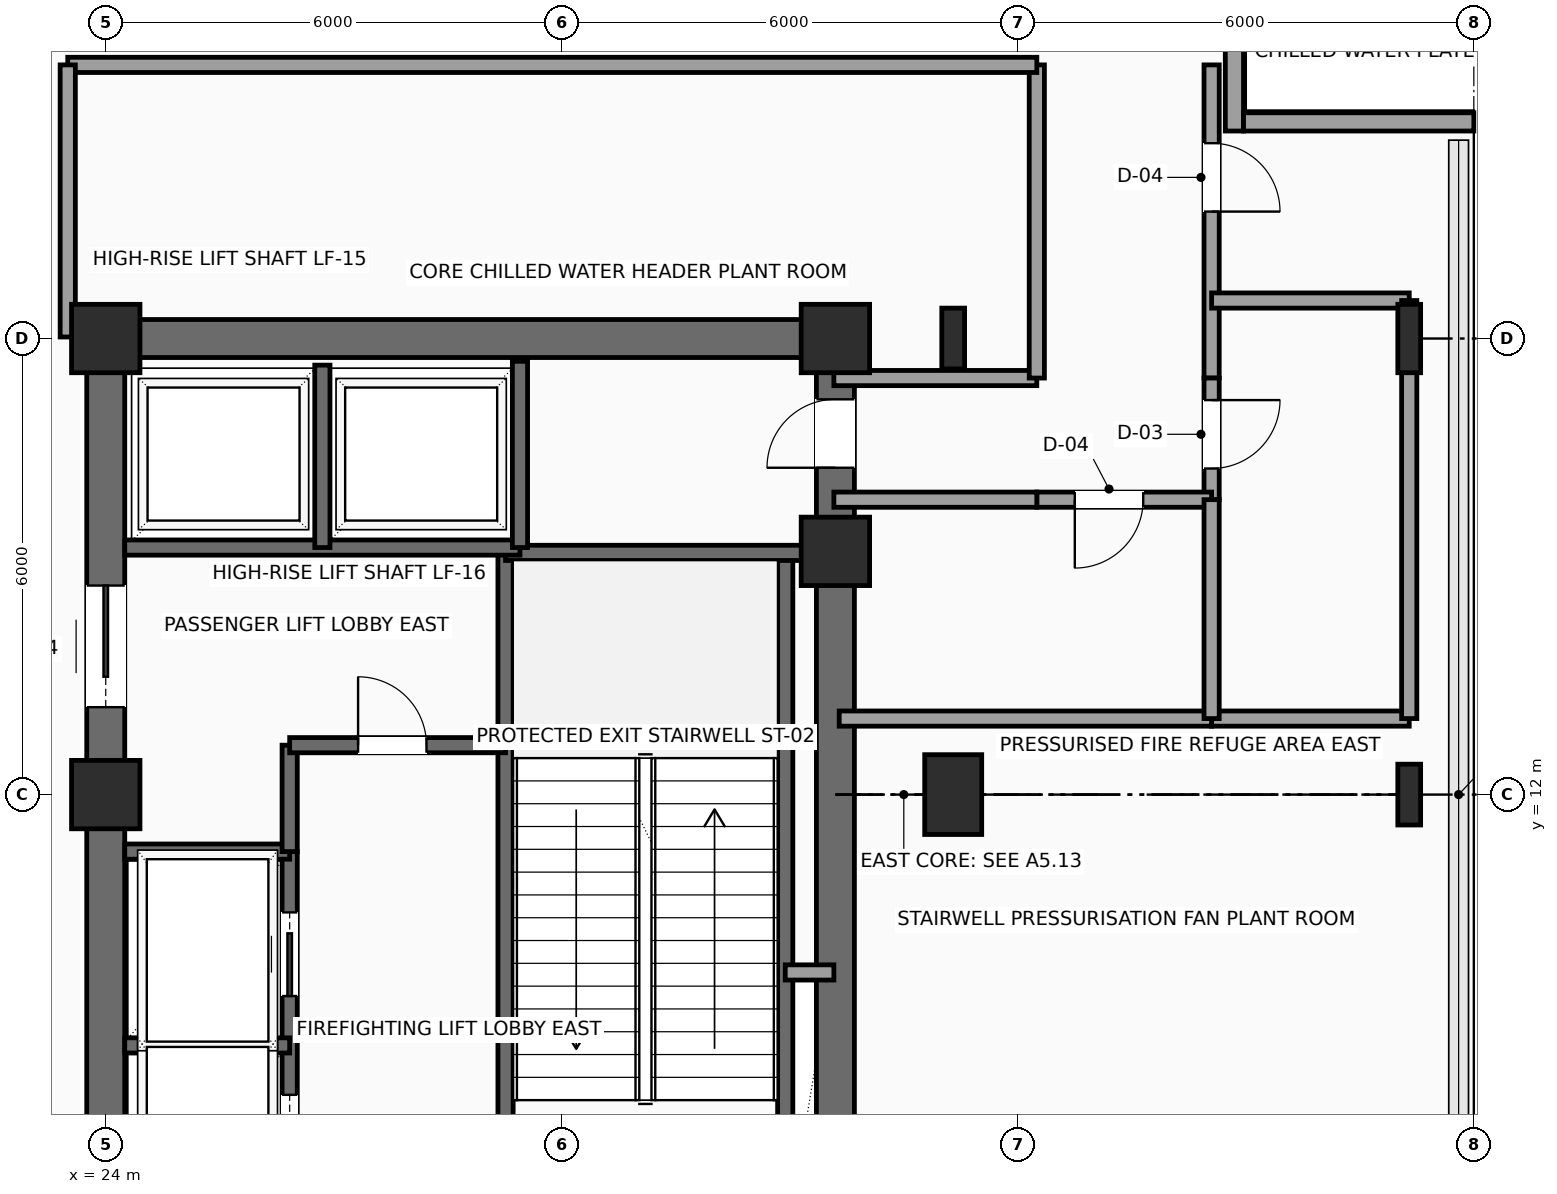
"""IFC4 building model, lengths in metres.
Left out: names, types, materials, properties, quantities, classifications, styles, units other than length and angle.
Written with IfcOpenShell. Run it as: python <this file> out.ifc"""

import sys

from ifc_helpers import new_model, si_unit, direction, frame, frame_2d, origin, origin_2d, place, context, subcontext, project, spatial, rectangle, i_section, extrude, element, fill, save


model = new_model("IFC4")
c1 = context("Model", 3, precision=1e-05, world=origin(), true_north=direction((0.0, 1.0)))
c2 = subcontext(c1, "Body", "Model", "MODEL_VIEW")
j1 = project(units=[si_unit("LENGTHUNIT", "METRE"), si_unit("PLANEANGLEUNIT", "RADIAN")], contexts=[c1])
p1 = place(None, origin())
s1 = spatial("IfcSite", under=j1, at=p1, CompositionType="ELEMENT")
p2 = place(p1, origin())
s2 = spatial("IfcBuilding", under=s1, at=p2, CompositionType="ELEMENT")
p3 = place(p2, frame((0.0, 0.0, 234.9)))
s3 = spatial("IfcBuildingStorey", under=s2, at=p3, CompositionType="ELEMENT", Elevation=234.9)
for number, where, z_axis, x_axis in (
    (1, (24.0, 12.0, 0.0), (0.0, 0.0, 1.0), (1.0, 0.0, 0.0)),
    (2, (24.0, 18.0, 0.0), (0.0, 0.0, 1.0), (1.0, 0.0, 0.0)),
    (3, (33.6, 15.2, 0.0), (0.0, 0.0, 1.0), (1.0, 0.0, 0.0)),
    (4, (33.6, 18.0, 0.0), (0.0, 0.0, 1.0), (1.0, 0.0, 0.0)),
):
    element("IfcColumn", number, at=place(p3, frame(where, z_axis=z_axis, x_axis=x_axis)), inside=s3, PredefinedType="COLUMN", context=c2, shape_type="SweptSolid", body=[
        extrude(rectangle(XDim=0.9, YDim=0.9, at=origin_2d()), origin(), (0.0, 0.0, 1.0), 4.8),
    ])
p4 = place(p3, frame((35.15, 12.0, 0.0), z_axis=(0.0, 0.0, 1.0), x_axis=(1.0, 0.0, 0.0)))
e5 = element("IfcColumn", 5, at=p4, inside=s3, PredefinedType="COLUMN", context=c2, shape_type="SweptSolid", body=[
    extrude(rectangle(XDim=0.75, YDim=1.05, at=origin_2d()), origin(), (0.0, 0.0, 1.0), 4.8),
])
p5 = place(p3, frame((35.15, 18.0, 0.0), z_axis=(0.0, 0.0, 1.0), x_axis=(1.0, 0.0, 0.0)))
e6 = element("IfcColumn", 6, at=p5, inside=s3, PredefinedType="COLUMN", context=c2, shape_type="SweptSolid", body=[
    extrude(i_section(OverallWidth=0.3, OverallDepth=0.8, WebThickness=0.018, FlangeThickness=0.033, FilletRadius=0.03, at=origin_2d()), origin(), (0.0, 0.0, 1.0), 4.8),
])
p6 = place(p3, frame((41.15, 12.0, 0.0), z_axis=(0.0, 0.0, 1.0), x_axis=(1.0, 0.0, 0.0)))
e7 = element("IfcColumn", 7, at=p6, inside=s3, PredefinedType="COLUMN", context=c2, shape_type="SweptSolid", body=[
    extrude(i_section(OverallWidth=0.3, OverallDepth=0.8, WebThickness=0.018, FlangeThickness=0.033, FilletRadius=0.03, at=origin_2d()), origin(), (0.0, 0.0, 1.0), 4.56),
])
p7 = place(p3, frame((41.15, 18.0, 0.0), z_axis=(0.0, 0.0, 1.0), x_axis=(1.0, 0.0, 0.0)))
e8 = element("IfcColumn", 8, at=p7, inside=s3, PredefinedType="COLUMN", context=c2, shape_type="SweptSolid", body=[
    extrude(i_section(OverallWidth=0.3, OverallDepth=0.9, WebThickness=0.019, FlangeThickness=0.035, FilletRadius=0.03, at=origin_2d()), origin(), (0.0, 0.0, 1.0), 4.56),
])
p8 = place(p3, frame((38.85, 23.725, 0.0), z_axis=(0.0, 0.0, 1.0), x_axis=(0.0, -1.0, 0.0)))
e9 = element("IfcWall", 9, at=p8, inside=s3, PredefinedType="SOLIDWALL", context=c2, shape_type="SweptSolid", body=[
    extrude(rectangle(XDim=2.995, YDim=0.24, at=frame_2d((1.498, 0.0))), origin(), (0.0, 0.0, 1.0), 4.6),
])
p9 = place(p3, frame((38.97, 20.85, 0.0), z_axis=(0.0, 0.0, 1.0), x_axis=(1.0, 0.0, 0.0)))
e10 = element("IfcWall", 10, at=p9, inside=s3, PredefinedType="SOLIDWALL", context=c2, shape_type="SweptSolid", body=[
    extrude(rectangle(XDim=3.03, YDim=0.24, at=frame_2d((1.515, 0.0))), origin(), (0.0, 0.0, 1.0), 4.6),
])
p10 = place(p3, frame((24.0, 18.0, 0.0), z_axis=(0.0, 0.0, 1.0), x_axis=(1.0, 0.0, 0.0)))
e11 = element("IfcWall", 11, at=p10, inside=s3, PredefinedType="SHEAR", context=c2, shape_type="SweptSolid", body=[
    extrude(rectangle(XDim=9.6, YDim=0.5, at=frame_2d((4.8, 0.0))), origin(), (0.0, 0.0, 1.0), 4.6),
])
p11 = place(p3, frame((24.0, 6.0, 0.0), z_axis=(0.0, 0.0, 1.0), x_axis=(0.0, 1.0, 0.0)))
e12 = element("IfcWall", 12, at=p11, inside=s3, PredefinedType="SHEAR", context=c2, shape_type="SweptSolid", body=[
    extrude(rectangle(XDim=12.0, YDim=0.5, at=frame_2d((6.0, 0.0))), origin(), (0.0, 0.0, 1.0), 4.6),
])
p12 = place(p11, frame((7.15, 0.0, 0.0)))
e13 = element("IfcOpeningElement", 13, at=p12, cuts=e12, PredefinedType="OPENING", context=c2, shape_type="SweptSolid", body=[
    extrude(rectangle(XDim=1.6, YDim=2.3, at=frame_2d((0.8, 1.15))), frame((0.0, 0.26, 0.0), z_axis=(0.0, -1.0, 0.0), x_axis=(1.0, 0.0, 0.0)), (0.0, 0.0, 1.0), 0.52),
])
p13 = place(p3, frame((33.6, 6.0, 0.0), z_axis=(0.0, 0.0, 1.0), x_axis=(0.0, 1.0, 0.0)))
e14 = element("IfcWall", 14, at=p13, inside=s3, PredefinedType="SHEAR", context=c2, shape_type="SweptSolid", body=[
    extrude(rectangle(XDim=12.0, YDim=0.5, at=frame_2d((6.0, 0.0))), origin(), (0.0, 0.0, 1.0), 4.6),
])
p14 = place(p13, frame((10.3, 0.0, 0.0)))
e15 = element("IfcOpeningElement", 15, at=p14, cuts=e14, PredefinedType="OPENING", context=c2, shape_type="SweptSolid", body=[
    extrude(rectangle(XDim=0.9, YDim=2.15, at=frame_2d((0.45, 1.075))), frame((0.0, 0.26, 0.0), z_axis=(0.0, -1.0, 0.0), x_axis=(1.0, 0.0, 0.0)), (0.0, 0.0, 1.0), 0.52),
])
p15 = place(p3, frame((29.26, 6.3, 0.0), z_axis=(0.0, 0.0, 1.0), x_axis=(0.0, 1.0, 0.0)))
e16 = element("IfcWall", 16, at=p15, inside=s3, PredefinedType="SHEAR", context=c2, shape_type="SweptSolid", body=[
    extrude(rectangle(XDim=8.88, YDim=0.2, at=frame_2d((4.44, 0.0))), origin(), (0.0, 0.0, 1.0), 4.6),
])
p16 = place(p15, frame((0.35, 0.0, 0.0)))
e17 = element("IfcOpeningElement", 17, at=p16, cuts=e16, PredefinedType="OPENING", context=c2, shape_type="SweptSolid", body=[
    extrude(rectangle(XDim=1.1, YDim=2.2, at=frame_2d((0.55, 1.1))), frame((0.0, 0.11, 0.0), z_axis=(0.0, -1.0, 0.0), x_axis=(1.0, 0.0, 0.0)), (0.0, 0.0, 1.0), 0.22),
])
p17 = place(p3, frame((32.94, 6.3, 0.0), z_axis=(0.0, 0.0, 1.0), x_axis=(0.0, 1.0, 0.0)))
e18 = element("IfcWall", 18, at=p17, inside=s3, PredefinedType="SHEAR", context=c2, shape_type="SweptSolid", body=[
    extrude(rectangle(XDim=8.88, YDim=0.2, at=frame_2d((4.44, 0.0))), origin(), (0.0, 0.0, 1.0), 4.6),
])
p18 = place(p3, frame((29.26, 15.18, 0.0), z_axis=(0.0, 0.0, 1.0), x_axis=(1.0, 0.0, 0.0)))
e19 = element("IfcWall", 19, at=p18, inside=s3, PredefinedType="SHEAR", context=c2, shape_type="SweptSolid", body=[
    extrude(rectangle(XDim=4.04, YDim=0.2, at=frame_2d((2.02, 0.0))), origin(), (0.0, 0.0, 1.0), 4.6),
])
p19 = place(p3, frame((26.42, 6.3, 0.0), z_axis=(0.0, 0.0, 1.0), x_axis=(0.0, 1.0, 0.0)))
e20 = element("IfcWall", 20, at=p19, inside=s3, PredefinedType="SHEAR", context=c2, shape_type="SweptSolid", body=[
    extrude(rectangle(XDim=4.95, YDim=0.2, at=frame_2d((2.475, 0.0))), origin(), (0.0, 0.0, 1.0), 4.6),
])
p20 = place(p19, frame((0.65, 0.0, 0.0)))
e21 = element("IfcOpeningElement", 21, at=p20, cuts=e20, PredefinedType="OPENING", context=c2, shape_type="SweptSolid", body=[
    extrude(rectangle(XDim=1.1, YDim=2.2, at=frame_2d((0.55, 1.1))), frame((0.0, 0.11, 0.0), z_axis=(0.0, -1.0, 0.0), x_axis=(1.0, 0.0, 0.0)), (0.0, 0.0, 1.0), 0.22),
])
p21 = place(p19, frame((3.05, 0.0, 0.0)))
e22 = element("IfcOpeningElement", 22, at=p21, cuts=e20, PredefinedType="OPENING", context=c2, shape_type="SweptSolid", body=[
    extrude(rectangle(XDim=1.1, YDim=2.2, at=frame_2d((0.55, 1.1))), frame((0.0, 0.11, 0.0), z_axis=(0.0, -1.0, 0.0), x_axis=(1.0, 0.0, 0.0)), (0.0, 0.0, 1.0), 0.22),
])
for number, where, z_axis, x_axis in (
    (23, (24.25, 8.7, 0.0), (0.0, 0.0, 1.0), (1.0, 0.0, 0.0)),
    (24, (24.25, 11.25, 0.0), (0.0, 0.0, 1.0), (1.0, 0.0, 0.0)),
):
    element("IfcWall", number, at=place(p3, frame(where, z_axis=z_axis, x_axis=x_axis)), inside=s3, PredefinedType="SHEAR", context=c2, shape_type="SweptSolid", body=[
        extrude(rectangle(XDim=2.17, YDim=0.2, at=frame_2d((1.085, 0.0))), origin(), (0.0, 0.0, 1.0), 4.6),
    ])
p22 = place(p3, frame((26.42, 11.25, 0.0), z_axis=(0.0, 0.0, 1.0), x_axis=(0.0, 1.0, 0.0)))
e25 = element("IfcWall", 25, at=p22, inside=s3, PredefinedType="SHEAR", context=c2, shape_type="SweptSolid", body=[
    extrude(rectangle(XDim=1.4, YDim=0.2, at=frame_2d((0.7, 0.0))), origin(), (0.0, 0.0, 1.0), 4.6),
])
p23 = place(p3, frame((26.42, 12.65, 0.0), z_axis=(0.0, 0.0, 1.0), x_axis=(1.0, 0.0, 0.0)))
e26 = element("IfcWall", 26, at=p23, inside=s3, PredefinedType="SHEAR", context=c2, shape_type="SweptSolid", body=[
    extrude(rectangle(XDim=2.84, YDim=0.2, at=frame_2d((1.42, 0.0))), origin(), (0.0, 0.0, 1.0), 4.6),
])
p24 = place(p23, frame((0.9, 0.0, 0.0)))
e27 = element("IfcOpeningElement", 27, at=p24, cuts=e26, PredefinedType="OPENING", context=c2, shape_type="SweptSolid", body=[
    extrude(rectangle(XDim=0.9, YDim=2.15, at=frame_2d((0.45, 1.075))), frame((0.0, 0.11, 0.0), z_axis=(0.0, -1.0, 0.0), x_axis=(1.0, 0.0, 0.0)), (0.0, 0.0, 1.0), 0.22),
])
p25 = place(p3, frame((32.94, 9.66, 0.0), z_axis=(0.0, 0.0, 1.0), x_axis=(1.0, 0.0, 0.0)))
e28 = element("IfcWall", 28, at=p25, inside=s3, PredefinedType="SOLIDWALL", context=c2, shape_type="SweptSolid", body=[
    extrude(rectangle(XDim=0.64, YDim=0.2, at=frame_2d((0.32, 0.0))), origin(), (0.0, 0.0, 1.0), 4.6),
])
p26 = place(p3, frame((24.25, 15.25, 0.0), z_axis=(0.0, 0.0, 1.0), x_axis=(1.0, 0.0, 0.0)))
e29 = element("IfcWall", 29, at=p26, inside=s3, PredefinedType="SHEAR", context=c2, shape_type="SweptSolid", body=[
    extrude(rectangle(XDim=5.2, YDim=0.2, at=frame_2d((2.6, 0.0))), origin(), (0.0, 0.0, 1.0), 4.6),
])
p27 = place(p3, frame((26.85, 15.25, 0.0), z_axis=(0.0, 0.0, 1.0), x_axis=(0.0, 1.0, 0.0)))
e30 = element("IfcWall", 30, at=p27, inside=s3, PredefinedType="SHEAR", context=c2, shape_type="SweptSolid", body=[
    extrude(rectangle(XDim=2.4, YDim=0.2, at=frame_2d((1.2, 0.0))), origin(), (0.0, 0.0, 1.0), 4.6),
])
p28 = place(p3, frame((29.45, 15.25, 0.0), z_axis=(0.0, 0.0, 1.0), x_axis=(0.0, 1.0, 0.0)))
e31 = element("IfcWall", 31, at=p28, inside=s3, PredefinedType="SHEAR", context=c2, shape_type="SweptSolid", body=[
    extrude(rectangle(XDim=2.45, YDim=0.2, at=frame_2d((1.225, 0.0))), origin(), (0.0, 0.0, 1.0), 4.6),
])
p29 = place(p3, frame((38.55, 21.6, 0.0), z_axis=(0.0, 0.0, 1.0), x_axis=(0.0, -1.0, 0.0)))
e32 = element("IfcWall", 32, at=p29, inside=s3, PredefinedType="SOLIDWALL", context=c2, shape_type="SweptSolid", body=[
    extrude(rectangle(XDim=4.12, YDim=0.2, at=frame_2d((2.06, 0.0))), origin(), (0.0, 0.0, 1.0), 4.6),
])
p30 = place(p29, frame((1.03, 0.0, 0.0)))
e33 = element("IfcOpeningElement", 33, at=p30, cuts=e32, PredefinedType="OPENING", context=c2, shape_type="SweptSolid", body=[
    extrude(rectangle(XDim=0.9, YDim=2.15, at=frame_2d((0.45, 1.075))), frame((0.0, 0.11, 0.0), z_axis=(0.0, -1.0, 0.0), x_axis=(1.0, 0.0, 0.0)), (0.0, 0.0, 1.0), 0.22),
])
p31 = place(p3, frame((38.55, 17.48, 0.0), z_axis=(0.0, 0.0, 1.0), x_axis=(0.0, -1.0, 0.0)))
e34 = element("IfcWall", 34, at=p31, inside=s3, PredefinedType="SOLIDWALL", context=c2, shape_type="SweptSolid", body=[
    extrude(rectangle(XDim=1.6, YDim=0.2, at=frame_2d((0.8, 0.0))), origin(), (0.0, 0.0, 1.0), 4.6),
])
p32 = place(p31, frame((0.29, 0.0, 0.0)))
e35 = element("IfcOpeningElement", 35, at=p32, cuts=e34, PredefinedType="OPENING", context=c2, shape_type="SweptSolid", body=[
    extrude(rectangle(XDim=0.9, YDim=2.15, at=frame_2d((0.45, 1.075))), frame((0.0, 0.11, 0.0), z_axis=(0.0, -1.0, 0.0), x_axis=(1.0, 0.0, 0.0)), (0.0, 0.0, 1.0), 0.22),
])
p33 = place(p3, frame((38.55, 15.88, 0.0), z_axis=(0.0, 0.0, 1.0), x_axis=(-1.0, 0.0, 0.0)))
e36 = element("IfcWall", 36, at=p33, inside=s3, PredefinedType="SOLIDWALL", context=c2, shape_type="SweptSolid", body=[
    extrude(rectangle(XDim=2.3, YDim=0.2, at=frame_2d((1.15, 0.0))), origin(), (0.0, 0.0, 1.0), 4.6),
])
p34 = place(p33, frame((0.9, 0.0, 0.0)))
e37 = element("IfcOpeningElement", 37, at=p34, cuts=e36, PredefinedType="OPENING", context=c2, shape_type="SweptSolid", body=[
    extrude(rectangle(XDim=0.9, YDim=2.15, at=frame_2d((0.45, 1.075))), frame((0.0, 0.11, 0.0), z_axis=(0.0, -1.0, 0.0), x_axis=(1.0, 0.0, 0.0)), (0.0, 0.0, 1.0), 0.22),
])
for number, where, z_axis, x_axis in (
    (38, (36.25, 15.88, 0.0), (0.0, 0.0, 1.0), (-1.0, 0.0, 0.0)),
    (39, (33.58, 17.48, 0.0), (0.0, 0.0, 1.0), (1.0, 0.0, 0.0)),
):
    element("IfcWall", number, at=place(p3, frame(where, z_axis=z_axis, x_axis=x_axis)), inside=s3, PredefinedType="SOLIDWALL", context=c2, shape_type="SweptSolid", body=[
        extrude(rectangle(XDim=2.67, YDim=0.2, at=frame_2d((1.335, 0.0))), origin(), (0.0, 0.0, 1.0), 4.6),
    ])
p35 = place(p3, frame((36.25, 17.48, 0.0), z_axis=(0.0, 0.0, 1.0), x_axis=(0.0, 1.0, 0.0)))
e40 = element("IfcWall", 40, at=p35, inside=s3, PredefinedType="SOLIDWALL", context=c2, shape_type="SweptSolid", body=[
    extrude(rectangle(XDim=4.12, YDim=0.2, at=frame_2d((2.06, 0.0))), origin(), (0.0, 0.0, 1.0), 4.6),
])
p36 = place(p3, frame((36.25, 21.6, 0.0), z_axis=(0.0, 0.0, 1.0), x_axis=(-1.0, 0.0, 0.0)))
e41 = element("IfcWall", 41, at=p36, inside=s3, PredefinedType="SOLIDWALL", context=c2, shape_type="SweptSolid", body=[
    extrude(rectangle(XDim=12.75, YDim=0.2, at=frame_2d((6.375, 0.0))), origin(), (0.0, 0.0, 1.0), 4.6),
])
p37 = place(p3, frame((23.5, 21.6, 0.0), z_axis=(0.0, 0.0, 1.0), x_axis=(0.0, -1.0, 0.0)))
e42 = element("IfcWall", 42, at=p37, inside=s3, PredefinedType="SOLIDWALL", context=c2, shape_type="SweptSolid", body=[
    extrude(rectangle(XDim=3.58, YDim=0.2, at=frame_2d((1.79, 0.0))), origin(), (0.0, 0.0, 1.0), 4.6),
])
for number, where, z_axis, x_axis in (
    (43, (38.55, 13.0, 0.0), (0.0, 0.0, 1.0), (1.0, 0.0, 0.0)),
    (44, (38.55, 18.5, 0.0), (0.0, 0.0, 1.0), (1.0, 0.0, 0.0)),
):
    element("IfcWall", number, at=place(p3, frame(where, z_axis=z_axis, x_axis=x_axis)), inside=s3, PredefinedType="SOLIDWALL", context=c2, shape_type="SweptSolid", body=[
        extrude(rectangle(XDim=2.6, YDim=0.2, at=frame_2d((1.3, 0.0))), origin(), (0.0, 0.0, 1.0), 4.6),
    ])
p38 = place(p3, frame((41.15, 13.0, 0.0), z_axis=(0.0, 0.0, 1.0), x_axis=(0.0, 1.0, 0.0)))
e45 = element("IfcWall", 45, at=p38, inside=s3, PredefinedType="SOLIDWALL", context=c2, shape_type="SweptSolid", body=[
    extrude(rectangle(XDim=5.5, YDim=0.2, at=frame_2d((2.75, 0.0))), origin(), (0.0, 0.0, 1.0), 4.052),
])
p39 = place(p3, frame((33.65, 13.0, 0.0), z_axis=(0.0, 0.0, 1.0), x_axis=(1.0, 0.0, 0.0)))
e46 = element("IfcWall", 46, at=p39, inside=s3, PredefinedType="SOLIDWALL", context=c2, shape_type="SweptSolid", body=[
    extrude(rectangle(XDim=4.9, YDim=0.2, at=frame_2d((2.45, 0.0))), origin(), (0.0, 0.0, 1.0), 4.6),
])
p40 = place(p3, frame((38.55, 13.0, 0.0), z_axis=(0.0, 0.0, 1.0), x_axis=(0.0, 1.0, 0.0)))
e47 = element("IfcWall", 47, at=p40, inside=s3, PredefinedType="SOLIDWALL", context=c2, shape_type="SweptSolid", body=[
    extrude(rectangle(XDim=2.88, YDim=0.2, at=frame_2d((1.44, 0.0))), origin(), (0.0, 0.0, 1.0), 4.6),
])
p41 = place(p12, origin())
e48 = element("IfcDoor", 48, at=p41, inside=s3, OperationType="DOUBLE_DOOR_SLIDING", PredefinedType="DOOR", context=c2, shape_type="SweptSolid", body=[
    extrude(rectangle(XDim=1.6, YDim=2.3, at=frame_2d((0.8, 1.15))), frame((0.0, 0.025, 0.0), z_axis=(0.0, -1.0, 0.0), x_axis=(1.0, 0.0, 0.0)), (0.0, 0.0, 1.0), 0.05),
])
fill(e13, e48)
p42 = place(p14, origin())
e49 = element("IfcDoor", 49, at=p42, inside=s3, OperationType="SINGLE_SWING_LEFT", PredefinedType="DOOR", context=c2, shape_type="SweptSolid", body=[
    extrude(rectangle(XDim=0.9, YDim=2.15, at=frame_2d((0.45, 1.075))), frame((0.0, 0.025, 0.0), z_axis=(0.0, -1.0, 0.0), x_axis=(1.0, 0.0, 0.0)), (0.0, 0.0, 1.0), 0.05),
])
fill(e15, e49)
p43 = place(p20, origin())
e50 = element("IfcDoor", 50, at=p43, inside=s3, OperationType="SLIDING_TO_LEFT", PredefinedType="DOOR", context=c2, shape_type="SweptSolid", body=[
    extrude(rectangle(XDim=1.1, YDim=2.2, at=frame_2d((0.55, 1.1))), frame((0.0, 0.025, 0.0), z_axis=(0.0, -1.0, 0.0), x_axis=(1.0, 0.0, 0.0)), (0.0, 0.0, 1.0), 0.05),
])
fill(e21, e50)
p44 = place(p21, origin())
e51 = element("IfcDoor", 51, at=p44, inside=s3, OperationType="SLIDING_TO_LEFT", PredefinedType="DOOR", context=c2, shape_type="SweptSolid", body=[
    extrude(rectangle(XDim=1.1, YDim=2.2, at=frame_2d((0.55, 1.1))), frame((0.0, 0.025, 0.0), z_axis=(0.0, -1.0, 0.0), x_axis=(1.0, 0.0, 0.0)), (0.0, 0.0, 1.0), 0.05),
])
fill(e22, e51)
p45 = place(p24, origin())
e52 = element("IfcDoor", 52, at=p45, inside=s3, OperationType="SINGLE_SWING_LEFT", PredefinedType="DOOR", context=c2, shape_type="SweptSolid", body=[
    extrude(rectangle(XDim=0.9, YDim=2.15, at=frame_2d((0.45, 1.075))), frame((0.0, 0.025, 0.0), z_axis=(0.0, -1.0, 0.0), x_axis=(1.0, 0.0, 0.0)), (0.0, 0.0, 1.0), 0.05),
])
fill(e27, e52)
p46 = place(p30, origin())
e53 = element("IfcDoor", 53, at=p46, inside=s3, OperationType="SINGLE_SWING_RIGHT", PredefinedType="DOOR", context=c2, shape_type="SweptSolid", body=[
    extrude(rectangle(XDim=0.9, YDim=2.15, at=frame_2d((0.45, 1.075))), frame((0.0, 0.025, 0.0), z_axis=(0.0, -1.0, 0.0), x_axis=(1.0, 0.0, 0.0)), (0.0, 0.0, 1.0), 0.05),
])
fill(e33, e53)
p47 = place(p32, origin())
e54 = element("IfcDoor", 54, at=p47, inside=s3, OperationType="SINGLE_SWING_LEFT", PredefinedType="DOOR", context=c2, shape_type="SweptSolid", body=[
    extrude(rectangle(XDim=0.9, YDim=2.15, at=frame_2d((0.45, 1.075))), frame((0.0, 0.025, 0.0), z_axis=(0.0, -1.0, 0.0), x_axis=(1.0, 0.0, 0.0)), (0.0, 0.0, 1.0), 0.05),
])
fill(e35, e54)
p48 = place(p34, origin())
e55 = element("IfcDoor", 55, at=p48, inside=s3, OperationType="SINGLE_SWING_RIGHT", PredefinedType="DOOR", context=c2, shape_type="SweptSolid", body=[
    extrude(rectangle(XDim=0.9, YDim=2.15, at=frame_2d((0.45, 1.075))), frame((0.0, 0.025, 0.0), z_axis=(0.0, -1.0, 0.0), x_axis=(1.0, 0.0, 0.0)), (0.0, 0.0, 1.0), 0.05),
])
fill(e37, e55)
save(model, sys.argv[1])
